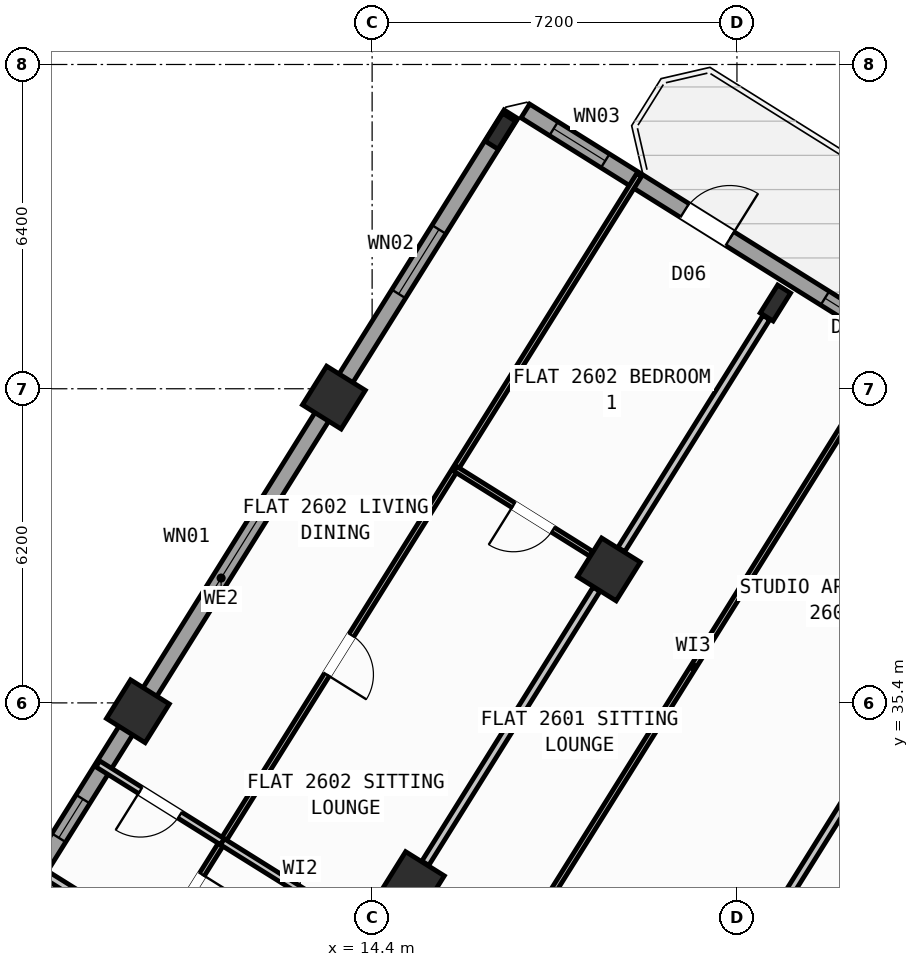
"""IFC4 building model, lengths in metres.
Left out: names, types, materials, properties, quantities, classifications, styles, units other than length and angle.
Written with IfcOpenShell. Run it as: python <this file> out.ifc"""

import sys

from ifc_helpers import new_model, si_unit, direction, frame, frame_2d, origin, origin_2d, place, context, subcontext, project, spatial, rectangle, hollow_rectangle, i_section, extrude, source, transform, mapped, element, fill, save


model = new_model("IFC4")
c1 = context("Model", 3, precision=1e-05, world=origin(), true_north=direction((0.0, 1.0)))
c2 = subcontext(c1, "Body", "Model", "MODEL_VIEW")
j1 = project(units=[si_unit("LENGTHUNIT", "METRE"), si_unit("PLANEANGLEUNIT", "RADIAN")], contexts=[c1])
p1 = place(None, origin())
s1 = spatial("IfcSite", under=j1, at=p1, CompositionType="ELEMENT")
p2 = place(p1, origin())
s2 = spatial("IfcBuilding", under=s1, at=p2, CompositionType="ELEMENT")
p3 = place(p2, frame((0.0, 0.0, 105.3)))
s3 = spatial("IfcBuildingStorey", under=s2, at=p3, CompositionType="ELEMENT", Elevation=105.3)
m1 = source(origin(), c2, "Body", "SweptSolid", [
    extrude(i_section(OverallWidth=0.3, OverallDepth=0.65, WebThickness=0.016, FlangeThickness=0.031, at=origin_2d()), origin(), (0.0, 0.0, 1.0), 3.6),
])
p4 = place(p3, frame((22.358, 43.292, 0.0), z_axis=(0.0, 0.0, 1.0), x_axis=(-0.848048096156, 0.529919264233, 0.0)))
e1 = element("IfcColumn", 1, at=p4, inside=s3, PredefinedType="COLUMN", context=c2, shape_type="MappedRepresentation", body=[
    mapped(m1, transform((0.0, 0.0, 0.0), scale=1.0)),
])
m2 = source(origin(), c2, "Body", "SweptSolid", [
    extrude(hollow_rectangle(XDim=0.9, YDim=0.9, WallThickness=0.036, at=origin_2d()), origin(), (0.0, 0.0, 1.0), 3.6),
])
for number, where, z_axis, x_axis in (
    (2, (19.073, 38.034, 0.0), (0.0, 0.0, 1.0), (-0.848, 0.53, 0.0)),
    (3, (15.205, 31.844, 0.0), (0.0, 0.0, 1.0), (-0.848, 0.53, 0.0)),
):
    element("IfcColumn", number, at=place(p3, frame(where, z_axis=z_axis, x_axis=x_axis)), inside=s3, PredefinedType="COLUMN", context=c2, shape_type="MappedRepresentation", body=[
        mapped(m2, transform((0.0, 0.0, 0.0), scale=1.0)),
    ])
p5 = place(p3, frame((16.931, 46.684, 0.0), z_axis=(0.0, 0.0, 1.0), x_axis=(-0.848048096156, 0.529919264233, 0.0)))
e4 = element("IfcColumn", 4, at=p5, inside=s3, PredefinedType="COLUMN", context=c2, shape_type="MappedRepresentation", body=[
    mapped(m1, transform((0.0, 0.0, 0.0), scale=1.0)),
])
for number, where, z_axis, x_axis in (
    (5, (13.646, 41.426, 0.0), (0.0, 0.0, 1.0), (-0.848, 0.53, 0.0)),
    (6, (9.777, 35.235, 0.0), (0.0, 0.0, 1.0), (-0.848, 0.53, 0.0)),
):
    element("IfcColumn", number, at=place(p3, frame(where, z_axis=z_axis, x_axis=x_axis)), inside=s3, PredefinedType="COLUMN", context=c2, shape_type="MappedRepresentation", body=[
        mapped(m2, transform((0.0, 0.0, 0.0), scale=1.0)),
    ])
p6 = place(p3, frame((5.7, 28.71, 0.0), z_axis=(0.0, 0.0, 1.0), x_axis=(0.529923711467, 0.8480453172, 0.0)))
e7 = element("IfcWall", 7, at=p6, inside=s3, PredefinedType="STANDARD", context=c2, shape_type="SweptSolid", body=[
    extrude(rectangle(XDim=21.587, YDim=0.32, at=frame_2d((10.794, 0.0))), origin(), (0.0, 0.0, 1.0), 2.775),
])
p7 = place(p6, frame((4.749, 0.0, 1.0)))
e8 = element("IfcOpeningElement", 8, at=p7, cuts=e7, PredefinedType="OPENING", context=c2, shape_type="SweptSolid", body=[
    extrude(rectangle(XDim=0.9, YDim=1.25, at=frame_2d((0.45, 0.625))), frame((0.0, 0.17, 0.0), z_axis=(0.0, -1.0, 0.0), x_axis=(1.0, 0.0, 0.0)), (0.0, 0.0, 1.0), 0.34),
])
p8 = place(p6, frame((10.444, 0.0, 0.85)))
e9 = element("IfcOpeningElement", 9, at=p8, cuts=e7, PredefinedType="OPENING", context=c2, shape_type="SweptSolid", body=[
    extrude(rectangle(XDim=1.8, YDim=1.5, at=frame_2d((0.9, 0.75))), frame((0.0, 0.17, 0.0), z_axis=(0.0, -1.0, 0.0), x_axis=(1.0, 0.0, 0.0)), (0.0, 0.0, 1.0), 0.34),
])
p9 = place(p6, frame((17.406, 0.0, 0.85)))
e10 = element("IfcOpeningElement", 10, at=p9, cuts=e7, PredefinedType="OPENING", context=c2, shape_type="SweptSolid", body=[
    extrude(rectangle(XDim=1.5, YDim=1.5, at=frame_2d((0.75, 0.75))), frame((0.0, 0.17, 0.0), z_axis=(0.0, -1.0, 0.0), x_axis=(1.0, 0.0, 0.0)), (0.0, 0.0, 1.0), 0.34),
])
p10 = place(p3, frame((17.424, 47.083, 0.0), z_axis=(0.0, 0.0, 1.0), x_axis=(0.848049927979, -0.529916332693, 0.0)))
e11 = element("IfcWall", 11, at=p10, inside=s3, PredefinedType="STANDARD", context=c2, shape_type="SweptSolid", body=[
    extrude(rectangle(XDim=29.223, YDim=0.32, at=frame_2d((14.612, 0.0))), origin(), (0.0, 0.0, 1.0), 3.35),
])
p11 = place(p10, frame((3.709, 0.0, 0.0)))
e12 = element("IfcOpeningElement", 12, at=p11, cuts=e11, PredefinedType="OPENING", context=c2, shape_type="SweptSolid", body=[
    extrude(rectangle(XDim=1.05, YDim=2.15, at=frame_2d((0.525, 1.075))), frame((0.0, 0.17, 0.0), z_axis=(0.0, -1.0, 0.0), x_axis=(1.0, 0.0, 0.0)), (0.0, 0.0, 1.0), 0.34),
])
p12 = place(p10, frame((0.659, 0.0, 0.95)))
e13 = element("IfcOpeningElement", 13, at=p12, cuts=e11, PredefinedType="OPENING", context=c2, shape_type="SweptSolid", body=[
    extrude(rectangle(XDim=1.2, YDim=1.4, at=frame_2d((0.6, 0.7))), frame((0.0, 0.17, 0.0), z_axis=(0.0, -1.0, 0.0), x_axis=(1.0, 0.0, 0.0)), (0.0, 0.0, 1.0), 0.34),
])
p13 = place(p10, frame((6.972, 0.0, 1.0)))
e14 = element("IfcOpeningElement", 14, at=p13, cuts=e11, PredefinedType="OPENING", context=c2, shape_type="SweptSolid", body=[
    extrude(rectangle(XDim=0.9, YDim=1.25, at=frame_2d((0.45, 0.625))), frame((0.0, 0.17, 0.0), z_axis=(0.0, -1.0, 0.0), x_axis=(1.0, 0.0, 0.0)), (0.0, 0.0, 1.0), 0.34),
])
p14 = place(p10, frame((9.847, 0.0, 0.85)))
e15 = element("IfcOpeningElement", 15, at=p14, cuts=e11, PredefinedType="OPENING", context=c2, shape_type="SweptSolid", body=[
    extrude(rectangle(XDim=1.5, YDim=1.5, at=frame_2d((0.75, 0.75))), frame((0.0, 0.17, 0.0), z_axis=(0.0, -1.0, 0.0), x_axis=(1.0, 0.0, 0.0)), (0.0, 0.0, 1.0), 0.34),
])
p15 = place(p10, frame((13.889, 0.0, 0.95)))
e16 = element("IfcOpeningElement", 16, at=p15, cuts=e11, PredefinedType="OPENING", context=c2, shape_type="SweptSolid", body=[
    extrude(rectangle(XDim=1.2, YDim=1.4, at=frame_2d((0.6, 0.7))), frame((0.0, 0.17, 0.0), z_axis=(0.0, -1.0, 0.0), x_axis=(1.0, 0.0, 0.0)), (0.0, 0.0, 1.0), 0.34),
])
p16 = place(p10, frame((17.254, 0.0, 1.0)))
e17 = element("IfcOpeningElement", 17, at=p16, cuts=e11, PredefinedType="OPENING", context=c2, shape_type="SweptSolid", body=[
    extrude(rectangle(XDim=0.9, YDim=1.25, at=frame_2d((0.45, 0.625))), frame((0.0, 0.17, 0.0), z_axis=(0.0, -1.0, 0.0), x_axis=(1.0, 0.0, 0.0)), (0.0, 0.0, 1.0), 0.34),
])
p17 = place(p10, frame((20.764, 0.0, 0.8)))
e18 = element("IfcOpeningElement", 18, at=p17, cuts=e11, PredefinedType="OPENING", context=c2, shape_type="SweptSolid", body=[
    extrude(rectangle(XDim=2.1, YDim=1.55, at=frame_2d((1.05, 0.775))), frame((0.0, 0.17, 0.0), z_axis=(0.0, -1.0, 0.0), x_axis=(1.0, 0.0, 0.0)), (0.0, 0.0, 1.0), 0.34),
])
p18 = place(p10, frame((25.403, 0.0, 0.8)))
e19 = element("IfcOpeningElement", 19, at=p18, cuts=e11, PredefinedType="OPENING", context=c2, shape_type="SweptSolid", body=[
    extrude(rectangle(XDim=2.1, YDim=1.55, at=frame_2d((1.05, 0.775))), frame((0.0, 0.17, 0.0), z_axis=(0.0, -1.0, 0.0), x_axis=(1.0, 0.0, 0.0)), (0.0, 0.0, 1.0), 0.34),
])
p19 = place(p3, frame((31.239, 38.274, 0.0), z_axis=(0.0, 0.0, 1.0), x_axis=(-0.529918119251, -0.84804881162, 0.0)))
e20 = element("IfcWall", 20, at=p19, inside=s3, PredefinedType="PARTITIONING", context=c2, shape_type="SweptSolid", body=[
    extrude(rectangle(XDim=17.65, YDim=0.16, at=frame_2d((8.825, 0.0))), origin(), (0.0, 0.0, 1.0), 3.34),
])
p20 = place(p3, frame((21.885, 23.306, 0.0), z_axis=(0.0, 0.0, 1.0), x_axis=(-0.848052408131, 0.529912363569, 0.0)))
e21 = element("IfcWall", 21, at=p20, inside=s3, PredefinedType="PARTITIONING", context=c2, shape_type="SweptSolid", body=[
    extrude(rectangle(XDim=16.73, YDim=0.16, at=frame_2d((8.365, 0.0))), origin(), (0.0, 0.0, 1.0), 3.34),
])
p21 = place(p20, frame((1.395, 0.0, 0.0)))
e22 = element("IfcOpeningElement", 22, at=p21, cuts=e21, PredefinedType="OPENING", context=c2, shape_type="SweptSolid", body=[
    extrude(rectangle(XDim=1.0, YDim=2.1, at=frame_2d((0.5, 1.05))), frame((0.0, 0.09, 0.0), z_axis=(0.0, -1.0, 0.0), x_axis=(1.0, 0.0, 0.0)), (0.0, 0.0, 1.0), 0.18),
])
p22 = place(p20, frame((7.82, 0.0, 0.0)))
e23 = element("IfcOpeningElement", 23, at=p22, cuts=e21, PredefinedType="OPENING", context=c2, shape_type="SweptSolid", body=[
    extrude(rectangle(XDim=1.0, YDim=2.1, at=frame_2d((0.5, 1.05))), frame((0.0, 0.09, 0.0), z_axis=(0.0, -1.0, 0.0), x_axis=(1.0, 0.0, 0.0)), (0.0, 0.0, 1.0), 0.18),
])
p23 = place(p20, frame((14.76, 0.0, 0.0)))
e24 = element("IfcOpeningElement", 24, at=p23, cuts=e21, PredefinedType="OPENING", context=c2, shape_type="SweptSolid", body=[
    extrude(rectangle(XDim=1.0, YDim=2.1, at=frame_2d((0.5, 1.05))), frame((0.0, 0.09, 0.0), z_axis=(0.0, -1.0, 0.0), x_axis=(1.0, 0.0, 0.0)), (0.0, 0.0, 1.0), 0.18),
])
p24 = place(p3, frame((24.256, 34.251, 0.0), z_axis=(0.0, 0.0, 1.0), x_axis=(-0.529919772691, -0.848047778437, 0.0)))
e25 = element("IfcWall", 25, at=p24, inside=s3, PredefinedType="PARTITIONING", context=c2, shape_type="SweptSolid", body=[
    extrude(rectangle(XDim=6.376, YDim=0.16, at=frame_2d((3.188, 0.0))), origin(), (0.0, 0.0, 1.0), 2.775),
])
p25 = place(p3, frame((22.18, 43.006, 0.0), z_axis=(0.0, 0.0, 1.0), x_axis=(-0.529913610495, -0.848051628978, 0.0)))
e26 = element("IfcWall", 26, at=p25, inside=s3, PredefinedType="PARTITIONING", context=c2, shape_type="SweptSolid", body=[
    extrude(rectangle(XDim=5.401, YDim=0.16, at=frame_2d((2.7, 0.0))), origin(), (0.0, 0.0, 1.0), 2.775),
])
p26 = place(p3, frame((18.828, 37.643, 0.0), z_axis=(0.0, 0.0, 1.0), x_axis=(-0.529930102756, -0.848041323399, 0.0)))
e27 = element("IfcWall", 27, at=p26, inside=s3, PredefinedType="PARTITIONING", context=c2, shape_type="SweptSolid", body=[
    extrude(rectangle(XDim=6.376, YDim=0.16, at=frame_2d((3.188, 0.0))), origin(), (0.0, 0.0, 1.0), 2.775),
])
p27 = place(p3, frame((24.802, 42.614, 0.0), z_axis=(0.0, 0.0, 1.0), x_axis=(-0.529928839727, -0.848042112649, 0.0)))
e28 = element("IfcWall", 28, at=p27, inside=s3, PredefinedType="PARTITIONING", context=c2, shape_type="SweptSolid", body=[
    extrude(rectangle(XDim=15.34, YDim=0.11, at=frame_2d((7.67, 0.0))), origin(), (0.0, 0.0, 1.0), 3.34),
])
p28 = place(p27, frame((0.47, 0.0, 0.0)))
e29 = element("IfcOpeningElement", 29, at=p28, cuts=e28, PredefinedType="OPENING", context=c2, shape_type="SweptSolid", body=[
    extrude(rectangle(XDim=0.92, YDim=2.08, at=frame_2d((0.46, 1.04))), frame((0.0, 0.065, 0.0), z_axis=(0.0, -1.0, 0.0), x_axis=(1.0, 0.0, 0.0)), (0.0, 0.0, 1.0), 0.13),
])
p29 = place(p3, frame((19.67, 45.821, 0.0), z_axis=(0.0, 0.0, 1.0), x_axis=(-0.529916887708, -0.848049581169, 0.0)))
e30 = element("IfcWall", 30, at=p29, inside=s3, PredefinedType="PARTITIONING", context=c2, shape_type="SweptSolid", body=[
    extrude(rectangle(XDim=17.92, YDim=0.11, at=frame_2d((8.96, 0.0))), origin(), (0.0, 0.0, 1.0), 3.34),
])
p30 = place(p29, frame((16.28, 0.0, 0.0)))
e31 = element("IfcOpeningElement", 31, at=p30, cuts=e30, PredefinedType="OPENING", context=c2, shape_type="SweptSolid", body=[
    extrude(rectangle(XDim=0.78, YDim=2.05, at=frame_2d((0.39, 1.025))), frame((0.0, 0.065, 0.0), z_axis=(0.0, -1.0, 0.0), x_axis=(1.0, 0.0, 0.0)), (0.0, 0.0, 1.0), 0.13),
])
p31 = place(p29, frame((10.711, 0.0, 0.0)))
e32 = element("IfcOpeningElement", 32, at=p31, cuts=e30, PredefinedType="OPENING", context=c2, shape_type="SweptSolid", body=[
    extrude(rectangle(XDim=0.92, YDim=2.08, at=frame_2d((0.46, 1.04))), frame((0.0, 0.065, 0.0), z_axis=(0.0, -1.0, 0.0), x_axis=(1.0, 0.0, 0.0)), (0.0, 0.0, 1.0), 0.13),
])
p32 = place(p3, frame((11.446, 32.659, 0.0), z_axis=(0.0, 0.0, 1.0), x_axis=(-0.848045593671, 0.529923269025, 0.0)))
e33 = element("IfcWall", 33, at=p32, inside=s3, PredefinedType="PLUMBINGWALL", context=c2, shape_type="SweptSolid", body=[
    extrude(rectangle(XDim=2.9, YDim=0.14, at=frame_2d((1.45, 0.0))), origin(), (0.0, 0.0, 1.0), 3.34),
])
p33 = place(p32, frame((0.99, 0.0, 0.0)))
e34 = element("IfcOpeningElement", 34, at=p33, cuts=e33, PredefinedType="OPENING", context=c2, shape_type="SweptSolid", body=[
    extrude(rectangle(XDim=0.92, YDim=2.08, at=frame_2d((0.46, 1.04))), frame((0.0, 0.08, 0.0), z_axis=(0.0, -1.0, 0.0), x_axis=(1.0, 0.0, 0.0)), (0.0, 0.0, 1.0), 0.16),
])
p34 = place(p3, frame((14.516, 30.741, 0.0), z_axis=(0.0, 0.0, 1.0), x_axis=(-0.848051346257, 0.52991406295, 0.0)))
e35 = element("IfcWall", 35, at=p34, inside=s3, PredefinedType="PLUMBINGWALL", context=c2, shape_type="SweptSolid", body=[
    extrude(rectangle(XDim=3.62, YDim=0.14, at=frame_2d((1.81, 0.0))), origin(), (0.0, 0.0, 1.0), 3.34),
])
p35 = place(p3, frame((18.722, 38.344, 0.0), z_axis=(0.0, 0.0, 1.0), x_axis=(-0.84807647212, 0.529873850493, 0.0)))
e36 = element("IfcWall", 36, at=p35, inside=s3, PredefinedType="PARTITIONING", context=c2, shape_type="SweptSolid", body=[
    extrude(rectangle(XDim=3.158, YDim=0.11, at=frame_2d((1.579, 0.0))), origin(), (0.0, 0.0, 1.0), 2.775),
])
p36 = place(p35, frame((0.888, 0.0, 0.0)))
e37 = element("IfcOpeningElement", 37, at=p36, cuts=e36, PredefinedType="OPENING", context=c2, shape_type="SweptSolid", body=[
    extrude(rectangle(XDim=0.92, YDim=2.08, at=frame_2d((0.46, 1.04))), frame((0.0, 0.065, 0.0), z_axis=(0.0, -1.0, 0.0), x_axis=(1.0, 0.0, 0.0)), (0.0, 0.0, 1.0), 0.13),
])
m3 = source(origin(), c2, "Body", "SweptSolid", [
    extrude(rectangle(XDim=1.05, YDim=2.15, at=frame_2d((0.525, 1.075))), frame((0.0, 0.025, 0.0), z_axis=(0.0, -1.0, 0.0), x_axis=(1.0, 0.0, 0.0)), (0.0, 0.0, 1.0), 0.05),
])
p37 = place(p11, origin())
e38 = element("IfcDoor", 38, at=p37, inside=s3, OperationType="SINGLE_SWING_RIGHT", PredefinedType="DOOR", context=c2, shape_type="MappedRepresentation", body=[
    mapped(m3, transform((0.0, 0.0, 0.0), scale=1.0)),
])
fill(e12, e38)
m4 = source(origin(), c2, "Body", "SweptSolid", [
    extrude(rectangle(XDim=0.9, YDim=1.25, at=frame_2d((0.45, 0.625))), frame((0.0, 0.03, 0.0), z_axis=(0.0, -1.0, 0.0), x_axis=(1.0, 0.0, 0.0)), (0.0, 0.0, 1.0), 0.06),
])
p38 = place(p7, origin())
e39 = element("IfcWindow", 39, at=p38, inside=s3, PartitioningType="SINGLE_PANEL", PredefinedType="WINDOW", context=c2, shape_type="MappedRepresentation", body=[
    mapped(m4, transform((0.0, 0.0, 0.0), scale=1.0)),
])
fill(e8, e39)
m5 = source(origin(), c2, "Body", "SweptSolid", [
    extrude(rectangle(XDim=1.8, YDim=1.5, at=frame_2d((0.9, 0.75))), frame((0.0, 0.03, 0.0), z_axis=(0.0, -1.0, 0.0), x_axis=(1.0, 0.0, 0.0)), (0.0, 0.0, 1.0), 0.06),
])
p39 = place(p8, origin())
e40 = element("IfcWindow", 40, at=p39, inside=s3, PartitioningType="SINGLE_PANEL", PredefinedType="WINDOW", context=c2, shape_type="MappedRepresentation", body=[
    mapped(m5, transform((0.0, 0.0, 0.0), scale=1.0)),
])
fill(e9, e40)
m6 = source(origin(), c2, "Body", "SweptSolid", [
    extrude(rectangle(XDim=1.5, YDim=1.5, at=frame_2d((0.75, 0.75))), frame((0.0, 0.03, 0.0), z_axis=(0.0, -1.0, 0.0), x_axis=(1.0, 0.0, 0.0)), (0.0, 0.0, 1.0), 0.06),
])
p40 = place(p9, origin())
e41 = element("IfcWindow", 41, at=p40, inside=s3, PartitioningType="SINGLE_PANEL", PredefinedType="WINDOW", context=c2, shape_type="MappedRepresentation", body=[
    mapped(m6, transform((0.0, 0.0, 0.0), scale=1.0)),
])
fill(e10, e41)
m7 = source(origin(), c2, "Body", "SweptSolid", [
    extrude(rectangle(XDim=1.2, YDim=1.4, at=frame_2d((0.6, 0.7))), frame((0.0, 0.03, 0.0), z_axis=(0.0, -1.0, 0.0), x_axis=(1.0, 0.0, 0.0)), (0.0, 0.0, 1.0), 0.06),
])
p41 = place(p12, origin())
e42 = element("IfcWindow", 42, at=p41, inside=s3, PartitioningType="SINGLE_PANEL", PredefinedType="WINDOW", context=c2, shape_type="MappedRepresentation", body=[
    mapped(m7, transform((0.0, 0.0, 0.0), scale=1.0)),
])
fill(e13, e42)
p42 = place(p13, origin())
e43 = element("IfcWindow", 43, at=p42, inside=s3, PartitioningType="SINGLE_PANEL", PredefinedType="WINDOW", context=c2, shape_type="MappedRepresentation", body=[
    mapped(m4, transform((0.0, 0.0, 0.0), scale=1.0)),
])
fill(e14, e43)
m8 = source(origin(), c2, "Body", "SweptSolid", [
    extrude(rectangle(XDim=0.92, YDim=2.08, at=frame_2d((0.46, 1.04))), frame((0.0, 0.025, 0.0), z_axis=(0.0, -1.0, 0.0), x_axis=(1.0, 0.0, 0.0)), (0.0, 0.0, 1.0), 0.05),
])
p43 = place(p33, origin())
e44 = element("IfcDoor", 44, at=p43, inside=s3, OperationType="SINGLE_SWING_RIGHT", PredefinedType="DOOR", context=c2, shape_type="MappedRepresentation", body=[
    mapped(m8, transform((0.0, 0.0, 0.0), scale=1.0)),
])
fill(e34, e44)
m9 = source(origin(), c2, "Body", "SweptSolid", [
    extrude(rectangle(XDim=0.78, YDim=2.05, at=frame_2d((0.39, 1.025))), frame((0.0, 0.025, 0.0), z_axis=(0.0, -1.0, 0.0), x_axis=(1.0, 0.0, 0.0)), (0.0, 0.0, 1.0), 0.05),
])
p44 = place(p30, origin())
e45 = element("IfcDoor", 45, at=p44, inside=s3, OperationType="SINGLE_SWING_LEFT", PredefinedType="DOOR", context=c2, shape_type="MappedRepresentation", body=[
    mapped(m9, transform((0.0, 0.0, 0.0), scale=1.0)),
])
fill(e31, e45)
p45 = place(p31, origin())
e46 = element("IfcDoor", 46, at=p45, inside=s3, OperationType="SINGLE_SWING_RIGHT", PredefinedType="DOOR", context=c2, shape_type="MappedRepresentation", body=[
    mapped(m8, transform((0.0, 0.0, 0.0), scale=1.0)),
])
fill(e32, e46)
p46 = place(p36, origin())
e47 = element("IfcDoor", 47, at=p46, inside=s3, OperationType="SINGLE_SWING_RIGHT", PredefinedType="DOOR", context=c2, shape_type="MappedRepresentation", body=[
    mapped(m8, transform((0.0, 0.0, 0.0), scale=1.0)),
])
fill(e37, e47)
save(model, sys.argv[1])
